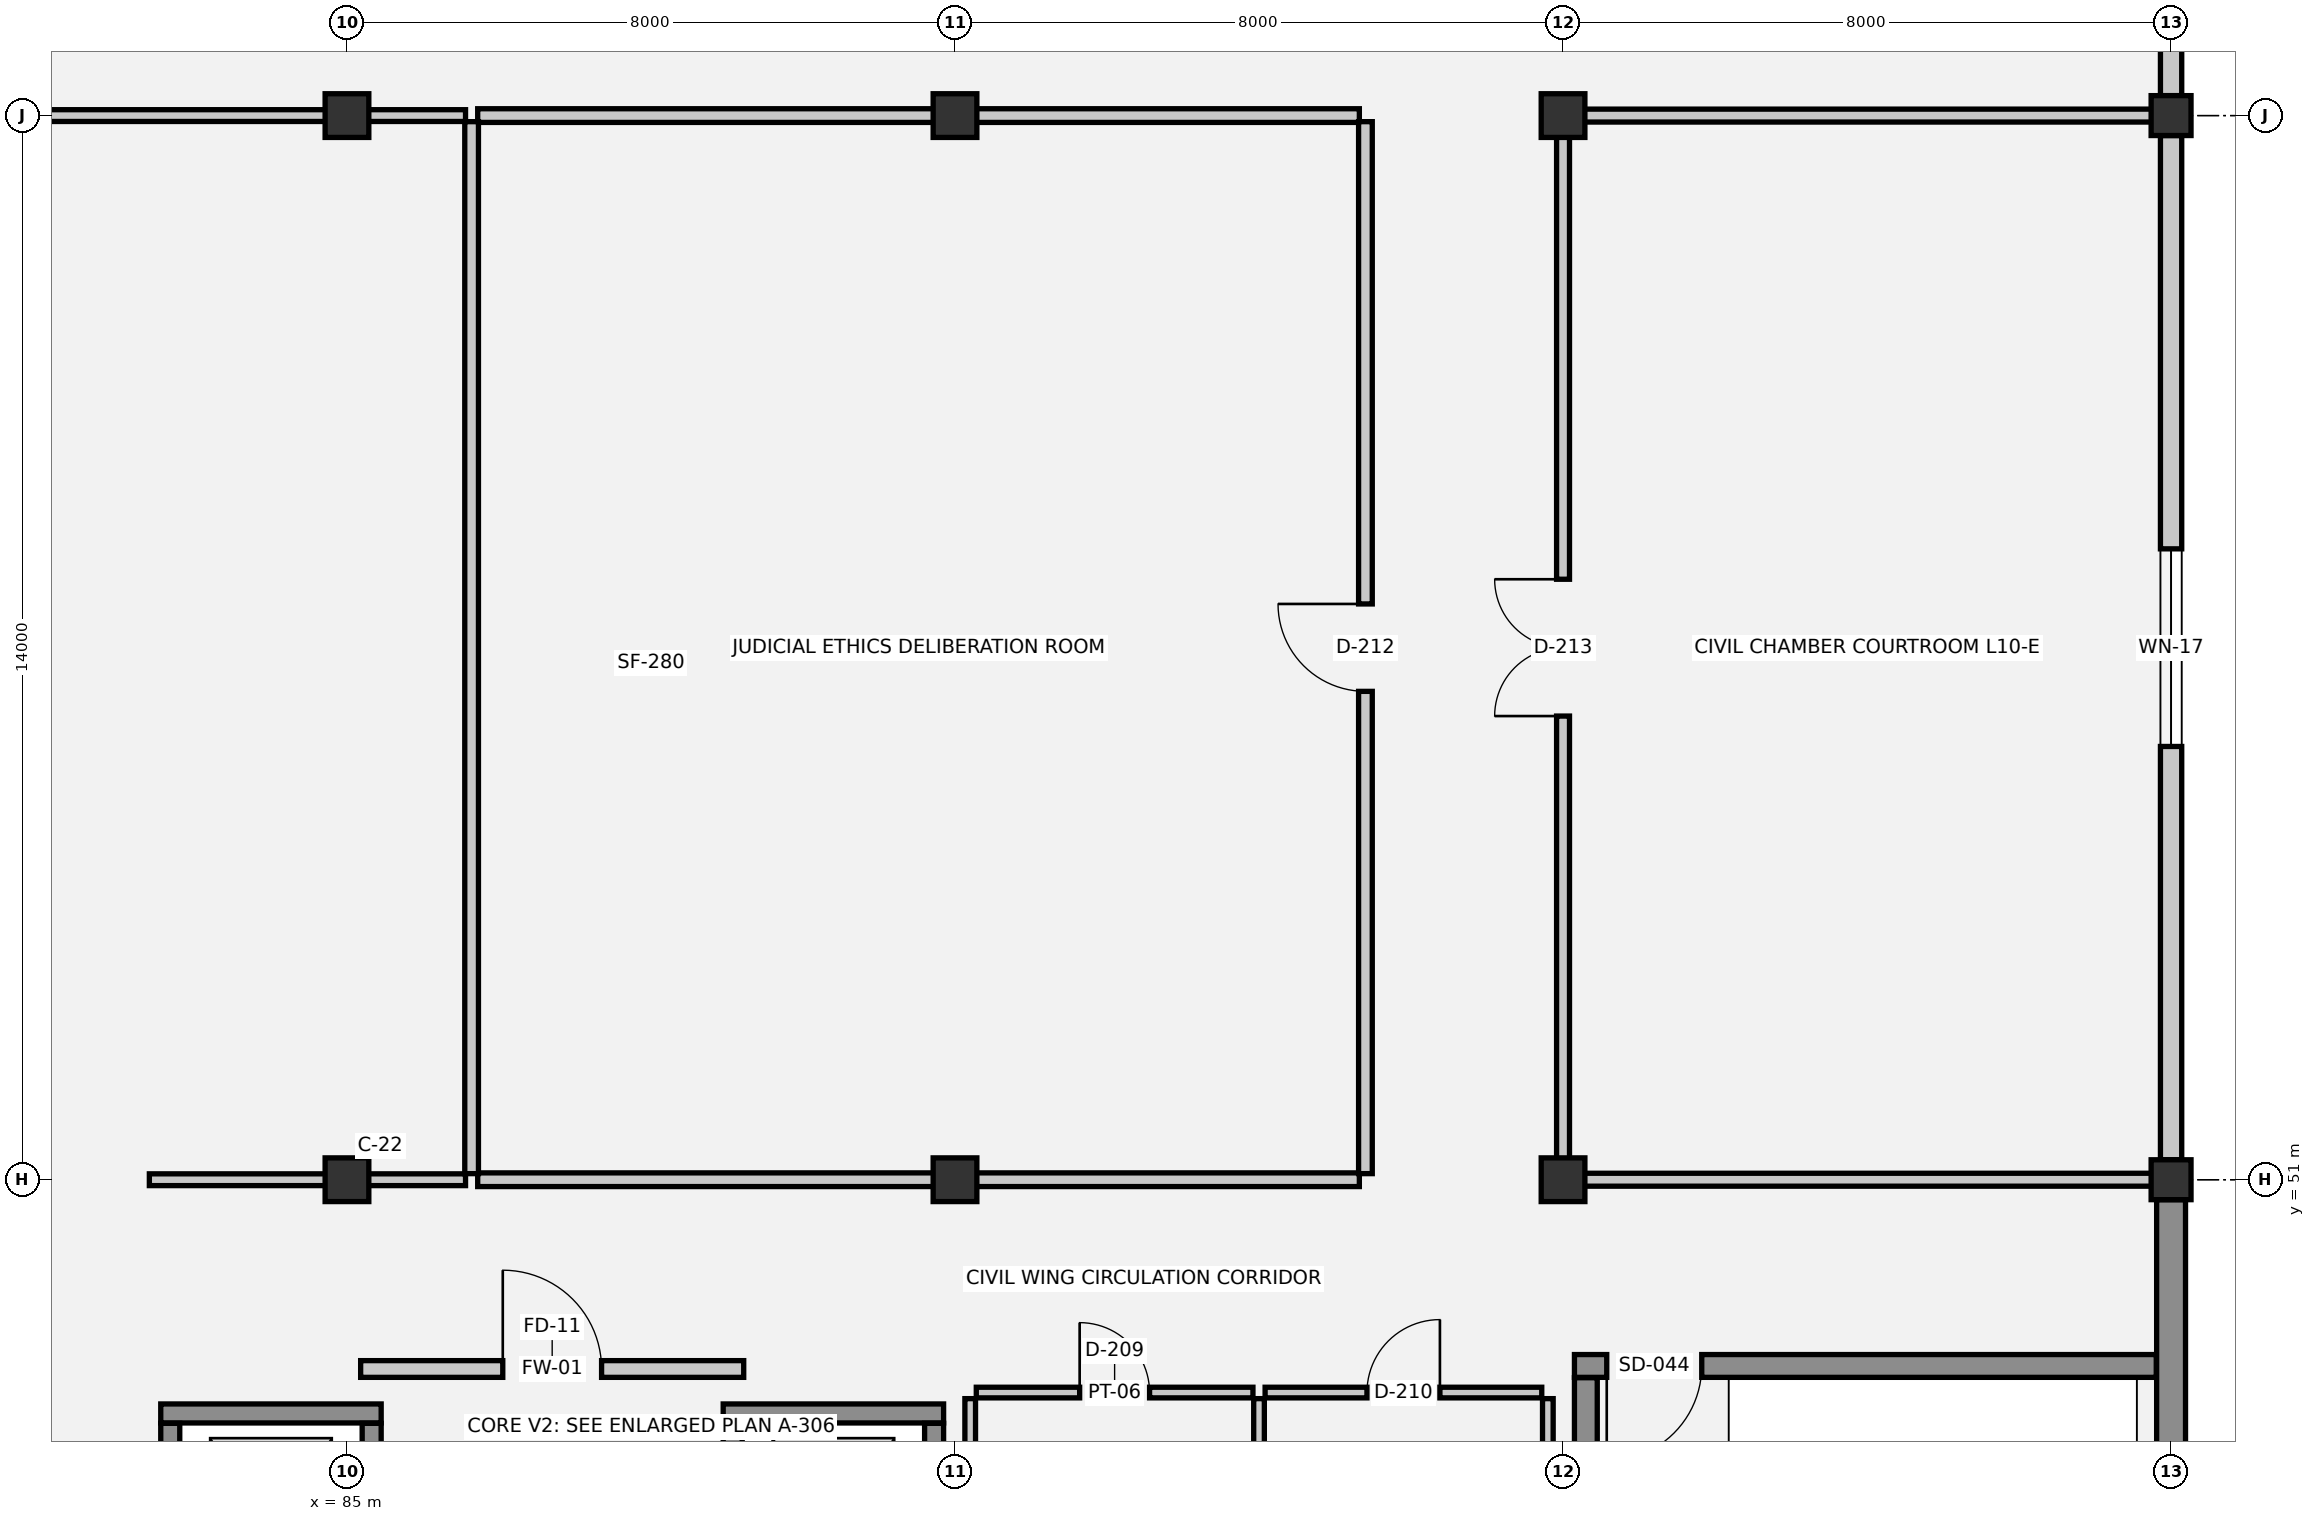
"""IFC4 building model, lengths in metres.
Left out: names, types, materials, properties, quantities, classifications, styles, units other than length and angle.
Written with IfcOpenShell. Run it as: python <this file> out.ifc"""

import sys

from ifc_helpers import new_model, si_unit, direction, frame, frame_2d, origin, origin_2d, place, context, subcontext, project, spatial, rectangle, extrude, element, fill, save


model = new_model("IFC4")
c1 = context("Model", 3, precision=1e-05, world=origin(), true_north=direction((0.0, 1.0)))
c2 = subcontext(c1, "Body", "Model", "MODEL_VIEW")
j1 = project(units=[si_unit("LENGTHUNIT", "METRE"), si_unit("PLANEANGLEUNIT", "RADIAN")], contexts=[c1])
p1 = place(None, origin())
s1 = spatial("IfcSite", under=j1, at=p1, CompositionType="ELEMENT")
p2 = place(p1, origin())
s2 = spatial("IfcBuilding", under=s1, at=p2, CompositionType="ELEMENT")
p3 = place(p2, frame((0.0, 0.0, 37.05)))
s3 = spatial("IfcBuildingStorey", under=s2, at=p3, CompositionType="ELEMENT", Elevation=37.05)
for number, where, z_axis, x_axis in (
    (1, (85.0, 51.0, 0.0), (0.0, 0.0, 1.0), (1.0, 0.0, 0.0)),
    (2, (85.0, 65.0, 0.0), (0.0, 0.0, 1.0), (1.0, 0.0, 0.0)),
    (3, (93.0, 51.0, 0.0), (0.0, 0.0, 1.0), (1.0, 0.0, 0.0)),
    (4, (93.0, 65.0, 0.0), (0.0, 0.0, 1.0), (1.0, 0.0, 0.0)),
    (5, (101.0, 51.0, 0.0), (0.0, 0.0, 1.0), (1.0, 0.0, 0.0)),
    (6, (101.0, 65.0, 0.0), (0.0, 0.0, 1.0), (1.0, 0.0, 0.0)),
):
    element("IfcColumn", number, at=place(p3, frame(where, z_axis=z_axis, x_axis=x_axis)), inside=s3, PredefinedType="COLUMN", context=c2, shape_type="SweptSolid", body=[
        extrude(rectangle(XDim=0.575, YDim=0.575, at=origin_2d()), origin(), (0.0, 0.0, 1.0), 3.75),
    ])
for number, where, z_axis, x_axis in (
    (7, (109.0, 51.0, 0.0), (0.0, 0.0, 1.0), (1.0, 0.0, 0.0)),
    (8, (109.0, 65.0, 0.0), (0.0, 0.0, 1.0), (1.0, 0.0, 0.0)),
):
    element("IfcColumn", number, at=place(p3, frame(where, z_axis=z_axis, x_axis=x_axis)), inside=s3, PredefinedType="COLUMN", context=c2, shape_type="SweptSolid", body=[
        extrude(rectangle(XDim=0.525, YDim=0.525, at=origin_2d()), origin(), (0.0, 0.0, 1.0), 3.75),
    ])
p4 = place(p3, frame((109.0, 71.738, 0.0), z_axis=(0.0, 0.0, 1.0), x_axis=(0.0, -1.0, 0.0)))
e9 = element("IfcWall", 9, at=p4, inside=s3, PredefinedType="SOLIDWALL", context=c2, shape_type="SweptSolid", body=[
    extrude(rectangle(XDim=6.475, YDim=0.28, at=frame_2d((3.238, 0.0))), origin(), (0.0, 0.0, 1.0), 2.6),
])
p5 = place(p4, frame((1.717, 0.0, 1.0)))
e10 = element("IfcOpeningElement", 10, at=p5, cuts=e9, PredefinedType="OPENING", context=c2, shape_type="SweptSolid", body=[
    extrude(rectangle(XDim=2.6, YDim=1.1, at=frame_2d((1.3, 0.55))), frame((0.0, 0.15, 0.0), z_axis=(0.0, -1.0, 0.0), x_axis=(1.0, 0.0, 0.0)), (0.0, 0.0, 1.0), 0.3),
])
p6 = place(p3, frame((109.0, 64.738, 0.0), z_axis=(0.0, 0.0, 1.0), x_axis=(0.0, -1.0, 0.0)))
e11 = element("IfcWall", 11, at=p6, inside=s3, PredefinedType="SOLIDWALL", context=c2, shape_type="SweptSolid", body=[
    extrude(rectangle(XDim=13.475, YDim=0.28, at=frame_2d((6.738, 0.0))), origin(), (0.0, 0.0, 1.0), 2.6),
])
p7 = place(p6, frame((5.438, 0.0, 1.0)))
e12 = element("IfcOpeningElement", 12, at=p7, cuts=e11, PredefinedType="OPENING", context=c2, shape_type="SweptSolid", body=[
    extrude(rectangle(XDim=2.6, YDim=1.1, at=frame_2d((1.3, 0.55))), frame((0.0, 0.15, 0.0), z_axis=(0.0, -1.0, 0.0), x_axis=(1.0, 0.0, 0.0)), (0.0, 0.0, 1.0), 0.3),
])
p8 = place(p3, frame((109.0, 50.738, 0.0), z_axis=(0.0, 0.0, 1.0), x_axis=(0.0, -1.0, 0.0)))
e13 = element("IfcWall", 13, at=p8, inside=s3, PredefinedType="STANDARD", context=c2, shape_type="SweptSolid", body=[
    extrude(rectangle(XDim=6.475, YDim=0.38, at=frame_2d((3.238, 0.0))), origin(), (0.0, 0.0, 1.0), 2.6),
])
p9 = place(p3, frame((85.45, 47.925, 0.0), z_axis=(0.0, 0.0, 1.0), x_axis=(-1.0, 0.0, 0.0)))
e14 = element("IfcWall", 14, at=p9, inside=s3, PredefinedType="SHEAR", context=c2, shape_type="SweptSolid", body=[
    extrude(rectangle(XDim=2.9, YDim=0.25, at=frame_2d((1.45, 0.0))), origin(), (0.0, 0.0, 1.0), 3.47),
])
p10 = place(p3, frame((82.675, 47.795, 0.0), z_axis=(0.0, 0.0, 1.0), x_axis=(0.0, -1.0, 0.0)))
e15 = element("IfcWall", 15, at=p10, inside=s3, PredefinedType="SHEAR", context=c2, shape_type="SweptSolid", body=[
    extrude(rectangle(XDim=2.79, YDim=0.25, at=frame_2d((1.395, 0.0))), origin(), (0.0, 0.0, 1.0), 3.47),
])
p11 = place(p3, frame((85.325, 45.005, 0.0), z_axis=(0.0, 0.0, 1.0), x_axis=(0.0, 1.0, 0.0)))
e16 = element("IfcWall", 16, at=p11, inside=s3, PredefinedType="SHEAR", context=c2, shape_type="SweptSolid", body=[
    extrude(rectangle(XDim=2.79, YDim=0.25, at=frame_2d((1.395, 0.0))), origin(), (0.0, 0.0, 1.0), 3.47),
])
p12 = place(p11, frame((0.795, 0.0, 0.0)))
e17 = element("IfcOpeningElement", 17, at=p12, cuts=e16, PredefinedType="OPENING", context=c2, shape_type="SweptSolid", body=[
    extrude(rectangle(XDim=1.2, YDim=2.2, at=frame_2d((0.6, 1.1))), frame((0.0, 0.135, 0.0), z_axis=(0.0, -1.0, 0.0), x_axis=(1.0, 0.0, 0.0)), (0.0, 0.0, 1.0), 0.27),
])
p13 = place(p3, frame((92.85, 47.925, 0.0), z_axis=(0.0, 0.0, 1.0), x_axis=(-1.0, 0.0, 0.0)))
e18 = element("IfcWall", 18, at=p13, inside=s3, PredefinedType="SHEAR", context=c2, shape_type="SweptSolid", body=[
    extrude(rectangle(XDim=2.9, YDim=0.25, at=frame_2d((1.45, 0.0))), origin(), (0.0, 0.0, 1.0), 3.47),
])
p14 = place(p3, frame((90.075, 47.795, 0.0), z_axis=(0.0, 0.0, 1.0), x_axis=(0.0, -1.0, 0.0)))
e19 = element("IfcWall", 19, at=p14, inside=s3, PredefinedType="SHEAR", context=c2, shape_type="SweptSolid", body=[
    extrude(rectangle(XDim=2.79, YDim=0.25, at=frame_2d((1.395, 0.0))), origin(), (0.0, 0.0, 1.0), 3.47),
])
p15 = place(p14, frame((0.795, 0.0, 0.0)))
e20 = element("IfcOpeningElement", 20, at=p15, cuts=e19, PredefinedType="OPENING", context=c2, shape_type="SweptSolid", body=[
    extrude(rectangle(XDim=1.2, YDim=2.2, at=frame_2d((0.6, 1.1))), frame((0.0, 0.135, 0.0), z_axis=(0.0, -1.0, 0.0), x_axis=(1.0, 0.0, 0.0)), (0.0, 0.0, 1.0), 0.27),
])
p16 = place(p3, frame((92.725, 45.005, 0.0), z_axis=(0.0, 0.0, 1.0), x_axis=(0.0, 1.0, 0.0)))
e21 = element("IfcWall", 21, at=p16, inside=s3, PredefinedType="SHEAR", context=c2, shape_type="SweptSolid", body=[
    extrude(rectangle(XDim=2.79, YDim=0.25, at=frame_2d((1.395, 0.0))), origin(), (0.0, 0.0, 1.0), 3.47),
])
p17 = place(p3, frame((108.805, 48.55, 0.0), z_axis=(0.0, 0.0, 1.0), x_axis=(-1.0, 0.0, 0.0)))
e22 = element("IfcWall", 22, at=p17, inside=s3, PredefinedType="SHEAR", context=c2, shape_type="SweptSolid", body=[
    extrude(rectangle(XDim=7.655, YDim=0.3, at=frame_2d((3.828, 0.0))), origin(), (0.0, 0.0, 1.0), 3.47),
])
p18 = place(p17, frame((5.98, 0.0, 0.0)))
e23 = element("IfcOpeningElement", 23, at=p18, cuts=e22, PredefinedType="OPENING", context=c2, shape_type="SweptSolid", body=[
    extrude(rectangle(XDim=1.25, YDim=2.15, at=frame_2d((0.625, 1.075))), frame((0.0, 0.16, 0.0), z_axis=(0.0, -1.0, 0.0), x_axis=(1.0, 0.0, 0.0)), (0.0, 0.0, 1.0), 0.32),
])
p19 = place(p3, frame((101.3, 48.395, 0.0), z_axis=(0.0, 0.0, 1.0), x_axis=(0.0, -1.0, 0.0)))
e24 = element("IfcWall", 24, at=p19, inside=s3, PredefinedType="SHEAR", context=c2, shape_type="SweptSolid", body=[
    extrude(rectangle(XDim=4.2, YDim=0.3, at=frame_2d((2.1, 0.0))), origin(), (0.0, 0.0, 1.0), 3.47),
])
p20 = place(p3, frame((85.18, 48.51, 0.0), z_axis=(0.0, 0.0, 1.0), x_axis=(1.0, 0.0, 0.0)))
e25 = element("IfcWall", 25, at=p20, inside=s3, PredefinedType="SOLIDWALL", context=c2, shape_type="SweptSolid", body=[
    extrude(rectangle(XDim=5.04, YDim=0.22, at=frame_2d((2.52, 0.0))), origin(), (0.0, 0.0, 1.0), 3.47),
])
p21 = place(p20, frame((1.87, 0.0, 0.0)))
e26 = element("IfcOpeningElement", 26, at=p21, cuts=e25, PredefinedType="OPENING", context=c2, shape_type="SweptSolid", body=[
    extrude(rectangle(XDim=1.3, YDim=2.15, at=frame_2d((0.65, 1.075))), frame((0.0, 0.12, 0.0), z_axis=(0.0, -1.0, 0.0), x_axis=(1.0, 0.0, 0.0)), (0.0, 0.0, 1.0), 0.24),
])
p22 = place(p3, frame((93.28, 48.2, 0.0), z_axis=(0.0, 0.0, 1.0), x_axis=(1.0, 0.0, 0.0)))
e27 = element("IfcWall", 27, at=p22, inside=s3, PredefinedType="PLUMBINGWALL", context=c2, shape_type="SweptSolid", body=[
    extrude(rectangle(XDim=3.64, YDim=0.14, at=frame_2d((1.82, 0.0))), origin(), (0.0, 0.0, 1.0), 3.39),
])
p23 = place(p22, frame((1.36, 0.0, 0.0)))
e28 = element("IfcOpeningElement", 28, at=p23, cuts=e27, PredefinedType="OPENING", context=c2, shape_type="SweptSolid", body=[
    extrude(rectangle(XDim=0.92, YDim=2.1, at=frame_2d((0.46, 1.05))), frame((0.0, 0.08, 0.0), z_axis=(0.0, -1.0, 0.0), x_axis=(1.0, 0.0, 0.0)), (0.0, 0.0, 1.0), 0.16),
])
p24 = place(p3, frame((97.08, 48.2, 0.0), z_axis=(0.0, 0.0, 1.0), x_axis=(1.0, 0.0, 0.0)))
e29 = element("IfcWall", 29, at=p24, inside=s3, PredefinedType="PLUMBINGWALL", context=c2, shape_type="SweptSolid", body=[
    extrude(rectangle(XDim=3.64, YDim=0.14, at=frame_2d((1.82, 0.0))), origin(), (0.0, 0.0, 1.0), 3.39),
])
p25 = place(p24, frame((1.34, 0.0, 0.0)))
e30 = element("IfcOpeningElement", 30, at=p25, cuts=e29, PredefinedType="OPENING", context=c2, shape_type="SweptSolid", body=[
    extrude(rectangle(XDim=0.96, YDim=2.1, at=frame_2d((0.48, 1.05))), frame((0.0, 0.08, 0.0), z_axis=(0.0, -1.0, 0.0), x_axis=(1.0, 0.0, 0.0)), (0.0, 0.0, 1.0), 0.16),
])
p26 = place(p3, frame((82.4, 51.0, 0.0), z_axis=(0.0, 0.0, 1.0), x_axis=(1.0, 0.0, 0.0)))
e31 = element("IfcWall", 31, at=p26, inside=s3, PredefinedType="PARTITIONING", context=c2, shape_type="SweptSolid", body=[
    extrude(rectangle(XDim=4.16, YDim=0.155, at=frame_2d((2.08, 0.0))), origin(), (0.0, 0.0, 1.0), 2.82),
])
p27 = place(p3, frame((86.72, 51.0, 0.0), z_axis=(0.0, 0.0, 1.0), x_axis=(1.0, 0.0, 0.0)))
e32 = element("IfcWall", 32, at=p27, inside=s3, PredefinedType="PARTITIONING", context=c2, shape_type="SweptSolid", body=[
    extrude(rectangle(XDim=11.6, YDim=0.18, at=frame_2d((5.8, 0.0))), origin(), (0.0, 0.0, 1.0), 2.82),
])
p28 = place(p3, frame((101.08, 51.0, 0.0), z_axis=(0.0, 0.0, 1.0), x_axis=(1.0, 0.0, 0.0)))
e33 = element("IfcWall", 33, at=p28, inside=s3, PredefinedType="PARTITIONING", context=c2, shape_type="SweptSolid", body=[
    extrude(rectangle(XDim=7.84, YDim=0.17, at=frame_2d((3.92, 0.0))), origin(), (0.0, 0.0, 1.0), 2.82),
])
p29 = place(p3, frame((69.08, 65.0, 0.0), z_axis=(0.0, 0.0, 1.0), x_axis=(1.0, 0.0, 0.0)))
e34 = element("IfcWall", 34, at=p29, inside=s3, PredefinedType="PARTITIONING", context=c2, shape_type="SweptSolid", body=[
    extrude(rectangle(XDim=17.48, YDim=0.155, at=frame_2d((8.74, 0.0))), origin(), (0.0, 0.0, 1.0), 2.82),
])
p30 = place(p29, frame((2.916, 0.0, 0.0)))
e35 = element("IfcOpeningElement", 35, at=p30, cuts=e34, PredefinedType="OPENING", context=c2, shape_type="SweptSolid", body=[
    extrude(rectangle(XDim=2.0, YDim=2.35, at=frame_2d((1.0, 1.175))), frame((0.0, 0.087, 0.0), z_axis=(0.0, -1.0, 0.0), x_axis=(1.0, 0.0, 0.0)), (0.0, 0.0, 1.0), 0.175),
])
p31 = place(p3, frame((86.72, 65.0, 0.0), z_axis=(0.0, 0.0, 1.0), x_axis=(1.0, 0.0, 0.0)))
e36 = element("IfcWall", 36, at=p31, inside=s3, PredefinedType="PARTITIONING", context=c2, shape_type="SweptSolid", body=[
    extrude(rectangle(XDim=11.6, YDim=0.18, at=frame_2d((5.8, 0.0))), origin(), (0.0, 0.0, 1.0), 2.82),
])
p32 = place(p3, frame((101.08, 65.0, 0.0), z_axis=(0.0, 0.0, 1.0), x_axis=(1.0, 0.0, 0.0)))
e37 = element("IfcWall", 37, at=p32, inside=s3, PredefinedType="PARTITIONING", context=c2, shape_type="SweptSolid", body=[
    extrude(rectangle(XDim=7.84, YDim=0.17, at=frame_2d((3.92, 0.0))), origin(), (0.0, 0.0, 1.0), 2.82),
])
p33 = place(p3, frame((86.64, 51.08, 0.0), z_axis=(0.0, 0.0, 1.0), x_axis=(0.0, 1.0, 0.0)))
e38 = element("IfcWall", 38, at=p33, inside=s3, PredefinedType="PARTITIONING", context=c2, shape_type="SweptSolid", body=[
    extrude(rectangle(XDim=13.84, YDim=0.18, at=frame_2d((6.92, 0.0))), origin(), (0.0, 0.0, 1.0), 3.39),
])
for number, where, z_axis, x_axis in (
    (39, (93.2, 44.08, 0.0), (0.0, 0.0, 1.0), (0.0, 1.0, 0.0)),
    (40, (97.0, 44.08, 0.0), (0.0, 0.0, 1.0), (0.0, 1.0, 0.0)),
):
    element("IfcWall", number, at=place(p3, frame(where, z_axis=z_axis, x_axis=x_axis)), inside=s3, PredefinedType="PLUMBINGWALL", context=c2, shape_type="SweptSolid", body=[
        extrude(rectangle(XDim=4.04, YDim=0.14, at=frame_2d((2.02, 0.0))), origin(), (0.0, 0.0, 1.0), 3.39),
    ])
p34 = place(p3, frame((98.4, 51.08, 0.0), z_axis=(0.0, 0.0, 1.0), x_axis=(0.0, 1.0, 0.0)))
e41 = element("IfcWall", 41, at=p34, inside=s3, PredefinedType="PARTITIONING", context=c2, shape_type="SweptSolid", body=[
    extrude(rectangle(XDim=13.84, YDim=0.18, at=frame_2d((6.92, 0.0))), origin(), (0.0, 0.0, 1.0), 3.39),
])
p35 = place(p34, frame((6.345, 0.0, 0.0)))
e42 = element("IfcOpeningElement", 42, at=p35, cuts=e41, PredefinedType="OPENING", context=c2, shape_type="SweptSolid", body=[
    extrude(rectangle(XDim=1.15, YDim=2.2, at=frame_2d((0.575, 1.1))), frame((0.0, 0.1, 0.0), z_axis=(0.0, -1.0, 0.0), x_axis=(1.0, 0.0, 0.0)), (0.0, 0.0, 1.0), 0.2),
])
p36 = place(p3, frame((100.8, 44.08, 0.0), z_axis=(0.0, 0.0, 1.0), x_axis=(0.0, 1.0, 0.0)))
e43 = element("IfcWall", 43, at=p36, inside=s3, PredefinedType="PLUMBINGWALL", context=c2, shape_type="SweptSolid", body=[
    extrude(rectangle(XDim=4.04, YDim=0.14, at=frame_2d((2.02, 0.0))), origin(), (0.0, 0.0, 1.0), 3.39),
])
p37 = place(p3, frame((101.0, 51.08, 0.0), z_axis=(0.0, 0.0, 1.0), x_axis=(0.0, 1.0, 0.0)))
e44 = element("IfcWall", 44, at=p37, inside=s3, PredefinedType="PARTITIONING", context=c2, shape_type="SweptSolid", body=[
    extrude(rectangle(XDim=13.84, YDim=0.17, at=frame_2d((6.92, 0.0))), origin(), (0.0, 0.0, 1.0), 2.62),
])
p38 = place(p37, frame((6.02, 0.0, 0.0)))
e45 = element("IfcOpeningElement", 45, at=p38, cuts=e44, PredefinedType="OPENING", context=c2, shape_type="SweptSolid", body=[
    extrude(rectangle(XDim=1.8, YDim=2.3, at=frame_2d((0.9, 1.15))), frame((0.0, 0.095, 0.0), z_axis=(0.0, -1.0, 0.0), x_axis=(1.0, 0.0, 0.0)), (0.0, 0.0, 1.0), 0.19),
])
p39 = place(p7, origin())
e46 = element("IfcWindow", 46, at=p39, inside=s3, PartitioningType="SINGLE_PANEL", PredefinedType="WINDOW", context=c2, shape_type="SweptSolid", body=[
    extrude(rectangle(XDim=2.6, YDim=1.1, at=frame_2d((1.3, 0.55))), frame((0.0, 0.03, 0.0), z_axis=(0.0, -1.0, 0.0), x_axis=(1.0, 0.0, 0.0)), (0.0, 0.0, 1.0), 0.06),
])
fill(e12, e46)
p40 = place(p18, origin())
e47 = element("IfcDoor", 47, at=p40, inside=s3, OperationType="SINGLE_SWING_RIGHT", PredefinedType="DOOR", context=c2, shape_type="SweptSolid", body=[
    extrude(rectangle(XDim=1.25, YDim=2.15, at=frame_2d((0.625, 1.075))), frame((0.0, 0.025, 0.0), z_axis=(0.0, -1.0, 0.0), x_axis=(1.0, 0.0, 0.0)), (0.0, 0.0, 1.0), 0.05),
])
fill(e23, e47)
p41 = place(p21, origin())
e48 = element("IfcDoor", 48, at=p41, inside=s3, OperationType="SINGLE_SWING_LEFT", PredefinedType="DOOR", context=c2, shape_type="SweptSolid", body=[
    extrude(rectangle(XDim=1.3, YDim=2.15, at=frame_2d((0.65, 1.075))), frame((0.0, 0.025, 0.0), z_axis=(0.0, -1.0, 0.0), x_axis=(1.0, 0.0, 0.0)), (0.0, 0.0, 1.0), 0.05),
])
fill(e26, e48)
p42 = place(p23, origin())
e49 = element("IfcDoor", 49, at=p42, inside=s3, OperationType="SINGLE_SWING_LEFT", PredefinedType="DOOR", context=c2, shape_type="SweptSolid", body=[
    extrude(rectangle(XDim=0.92, YDim=2.1, at=frame_2d((0.46, 1.05))), frame((0.0, 0.025, 0.0), z_axis=(0.0, -1.0, 0.0), x_axis=(1.0, 0.0, 0.0)), (0.0, 0.0, 1.0), 0.05),
])
fill(e28, e49)
p43 = place(p25, origin())
e50 = element("IfcDoor", 50, at=p43, inside=s3, OperationType="SINGLE_SWING_RIGHT", PredefinedType="DOOR", context=c2, shape_type="SweptSolid", body=[
    extrude(rectangle(XDim=0.96, YDim=2.1, at=frame_2d((0.48, 1.05))), frame((0.0, 0.025, 0.0), z_axis=(0.0, -1.0, 0.0), x_axis=(1.0, 0.0, 0.0)), (0.0, 0.0, 1.0), 0.05),
])
fill(e30, e50)
p44 = place(p35, origin())
e51 = element("IfcDoor", 51, at=p44, inside=s3, OperationType="SINGLE_SWING_RIGHT", PredefinedType="DOOR", context=c2, shape_type="SweptSolid", body=[
    extrude(rectangle(XDim=1.15, YDim=2.2, at=frame_2d((0.575, 1.1))), frame((0.0, 0.025, 0.0), z_axis=(0.0, -1.0, 0.0), x_axis=(1.0, 0.0, 0.0)), (0.0, 0.0, 1.0), 0.05),
])
fill(e42, e51)
p45 = place(p38, origin())
e52 = element("IfcDoor", 52, at=p45, inside=s3, OperationType="DOUBLE_DOOR_SINGLE_SWING", PredefinedType="DOOR", context=c2, shape_type="SweptSolid", body=[
    extrude(rectangle(XDim=1.8, YDim=2.3, at=frame_2d((0.9, 1.15))), frame((0.0, 0.025, 0.0), z_axis=(0.0, -1.0, 0.0), x_axis=(1.0, 0.0, 0.0)), (0.0, 0.0, 1.0), 0.05),
])
fill(e45, e52)
save(model, sys.argv[1])
